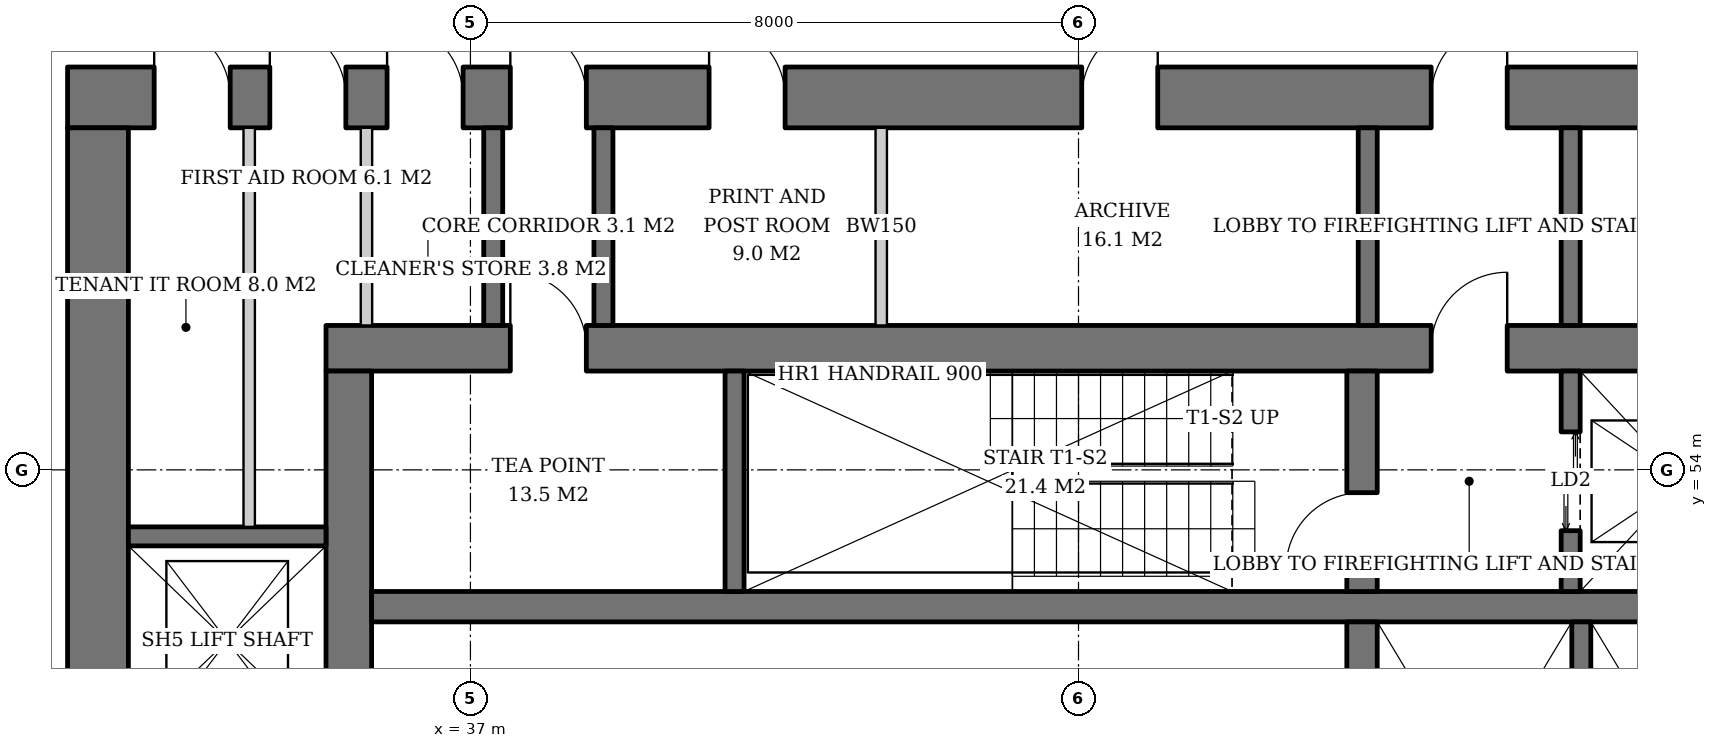
"""IFC4 building model, lengths in metres.
Left out: names, types, materials, properties, quantities, classifications, styles, units other than length and angle.
Written with IfcOpenShell. Run it as: python <this file> out.ifc"""

import sys

from ifc_helpers import new_model, si_unit, direction, frame, frame_2d, origin, place, context, subcontext, project, spatial, rectangle, extrude, element, fill, save


model = new_model("IFC4")
c1 = context("Model", 3, precision=1e-05, world=origin(), true_north=direction((0.0, 1.0)))
c2 = subcontext(c1, "Body", "Model", "MODEL_VIEW")
j1 = project(units=[si_unit("LENGTHUNIT", "METRE"), si_unit("PLANEANGLEUNIT", "RADIAN")], contexts=[c1])
p1 = place(None, origin())
s1 = spatial("IfcSite", under=j1, at=p1, CompositionType="ELEMENT")
p2 = place(p1, origin())
s2 = spatial("IfcBuilding", under=s1, at=p2, CompositionType="ELEMENT")
p3 = place(p2, frame((0.0, 0.0, 70.4)))
s3 = spatial("IfcBuildingStorey", under=s2, at=p3, CompositionType="ELEMENT", Elevation=70.4)
p4 = place(p3, frame((35.1, 55.6, 0.0), z_axis=(0.0, 0.0, 1.0), x_axis=(1.0, 0.0, 0.0)))
e1 = element("IfcWall", 1, at=p4, inside=s3, PredefinedType="SHEAR", context=c2, shape_type="SweptSolid", body=[
    extrude(rectangle(XDim=19.8, YDim=0.6, at=frame_2d((9.9, 0.0))), origin(), (0.0, 0.0, 1.0), 3.8),
])
p5 = place(p4, frame((14.54, 0.0, 0.0)))
e2 = element("IfcOpeningElement", 2, at=p5, cuts=e1, PredefinedType="OPENING", context=c2, shape_type="SweptSolid", body=[
    extrude(rectangle(XDim=1.0, YDim=2.1, at=frame_2d((0.5, 1.05))), frame((0.0, 0.31, 0.0), z_axis=(0.0, -1.0, 0.0), x_axis=(1.0, 0.0, 0.0)), (0.0, 0.0, 1.0), 0.62),
])
p6 = place(p4, frame((2.425, 0.0, 0.0)))
e3 = element("IfcOpeningElement", 3, at=p6, cuts=e1, PredefinedType="OPENING", context=c2, shape_type="SweptSolid", body=[
    extrude(rectangle(XDim=1.0, YDim=2.1, at=frame_2d((0.5, 1.05))), frame((0.0, 0.31, 0.0), z_axis=(0.0, -1.0, 0.0), x_axis=(1.0, 0.0, 0.0)), (0.0, 0.0, 1.0), 0.62),
])
p7 = place(p3, frame((35.4, 36.7, 0.0), z_axis=(0.0, 0.0, 1.0), x_axis=(0.0, 1.0, 0.0)))
e4 = element("IfcWall", 4, at=p7, inside=s3, PredefinedType="SHEAR", context=c2, shape_type="SweptSolid", body=[
    extrude(rectangle(XDim=18.6, YDim=0.6, at=frame_2d((9.3, 0.0))), origin(), (0.0, 0.0, 1.0), 3.8),
])
p8 = place(p7, frame((8.4, 0.0, 0.0)))
e5 = element("IfcOpeningElement", 5, at=p8, cuts=e4, PredefinedType="OPENING", context=c2, shape_type="SweptSolid", body=[
    extrude(rectangle(XDim=1.8, YDim=2.4, at=frame_2d((0.9, 1.2))), frame((0.0, 0.31, 0.0), z_axis=(0.0, -1.0, 0.0), x_axis=(1.0, 0.0, 0.0)), (0.0, 0.0, 1.0), 0.62),
])
p9 = place(p3, frame((31.7, 58.9, 0.0), z_axis=(0.0, 0.0, 1.0), x_axis=(1.0, 0.0, 0.0)))
e6 = element("IfcWall", 6, at=p9, inside=s3, PredefinedType="SHEAR", context=c2, shape_type="SweptSolid", body=[
    extrude(rectangle(XDim=26.6, YDim=0.8, at=frame_2d((13.3, 0.0))), origin(), (0.0, 0.0, 1.0), 3.8),
])
p10 = place(p9, frame((17.94, 0.0, 0.0)))
e7 = element("IfcOpeningElement", 7, at=p10, cuts=e6, PredefinedType="OPENING", context=c2, shape_type="SweptSolid", body=[
    extrude(rectangle(XDim=1.0, YDim=2.1, at=frame_2d((0.5, 1.05))), frame((0.0, 0.41, 0.0), z_axis=(0.0, -1.0, 0.0), x_axis=(1.0, 0.0, 0.0)), (0.0, 0.0, 1.0), 0.82),
])
p11 = place(p9, frame((5.825, 0.0, 0.0)))
e8 = element("IfcOpeningElement", 8, at=p11, cuts=e6, PredefinedType="OPENING", context=c2, shape_type="SweptSolid", body=[
    extrude(rectangle(XDim=1.0, YDim=2.1, at=frame_2d((0.5, 1.05))), frame((0.0, 0.41, 0.0), z_axis=(0.0, -1.0, 0.0), x_axis=(1.0, 0.0, 0.0)), (0.0, 0.0, 1.0), 0.82),
])
p12 = place(p9, frame((1.139, 0.0, 0.0)))
e9 = element("IfcOpeningElement", 9, at=p12, cuts=e6, PredefinedType="OPENING", context=c2, shape_type="SweptSolid", body=[
    extrude(rectangle(XDim=1.0, YDim=2.1, at=frame_2d((0.5, 1.05))), frame((0.0, 0.41, 0.0), z_axis=(0.0, -1.0, 0.0), x_axis=(1.0, 0.0, 0.0)), (0.0, 0.0, 1.0), 0.82),
])
p13 = place(p9, frame((2.661, 0.0, 0.0)))
e10 = element("IfcOpeningElement", 10, at=p13, cuts=e6, PredefinedType="OPENING", context=c2, shape_type="SweptSolid", body=[
    extrude(rectangle(XDim=1.0, YDim=2.1, at=frame_2d((0.5, 1.05))), frame((0.0, 0.41, 0.0), z_axis=(0.0, -1.0, 0.0), x_axis=(1.0, 0.0, 0.0)), (0.0, 0.0, 1.0), 0.82),
])
p14 = place(p9, frame((4.204, 0.0, 0.0)))
e11 = element("IfcOpeningElement", 11, at=p14, cuts=e6, PredefinedType="OPENING", context=c2, shape_type="SweptSolid", body=[
    extrude(rectangle(XDim=1.0, YDim=2.1, at=frame_2d((0.5, 1.05))), frame((0.0, 0.41, 0.0), z_axis=(0.0, -1.0, 0.0), x_axis=(1.0, 0.0, 0.0)), (0.0, 0.0, 1.0), 0.82),
])
p15 = place(p9, frame((8.44, 0.0, 0.0)))
e12 = element("IfcOpeningElement", 12, at=p15, cuts=e6, PredefinedType="OPENING", context=c2, shape_type="SweptSolid", body=[
    extrude(rectangle(XDim=1.0, YDim=2.1, at=frame_2d((0.5, 1.05))), frame((0.0, 0.41, 0.0), z_axis=(0.0, -1.0, 0.0), x_axis=(1.0, 0.0, 0.0)), (0.0, 0.0, 1.0), 0.82),
])
p16 = place(p9, frame((13.342, 0.0, 0.0)))
e13 = element("IfcOpeningElement", 13, at=p16, cuts=e6, PredefinedType="OPENING", context=c2, shape_type="SweptSolid", body=[
    extrude(rectangle(XDim=1.0, YDim=2.1, at=frame_2d((0.5, 1.05))), frame((0.0, 0.41, 0.0), z_axis=(0.0, -1.0, 0.0), x_axis=(1.0, 0.0, 0.0)), (0.0, 0.0, 1.0), 0.82),
])
p17 = place(p9, frame((22.35, 0.0, 0.0)))
e14 = element("IfcOpeningElement", 14, at=p17, cuts=e6, PredefinedType="OPENING", context=c2, shape_type="SweptSolid", body=[
    extrude(rectangle(XDim=1.0, YDim=2.1, at=frame_2d((0.5, 1.05))), frame((0.0, 0.41, 0.0), z_axis=(0.0, -1.0, 0.0), x_axis=(1.0, 0.0, 0.0)), (0.0, 0.0, 1.0), 0.82),
])
p18 = place(p3, frame((32.1, 33.5, 0.0), z_axis=(0.0, 0.0, 1.0), x_axis=(0.0, 1.0, 0.0)))
e15 = element("IfcWall", 15, at=p18, inside=s3, PredefinedType="SHEAR", context=c2, shape_type="SweptSolid", body=[
    extrude(rectangle(XDim=25.0, YDim=0.8, at=frame_2d((12.5, 0.0))), origin(), (0.0, 0.0, 1.0), 3.8),
])
p19 = place(p18, frame((11.6, 0.0, 0.0)))
e16 = element("IfcOpeningElement", 16, at=p19, cuts=e15, PredefinedType="OPENING", context=c2, shape_type="SweptSolid", body=[
    extrude(rectangle(XDim=1.8, YDim=2.4, at=frame_2d((0.9, 1.2))), frame((0.0, 0.41, 0.0), z_axis=(0.0, -1.0, 0.0), x_axis=(1.0, 0.0, 0.0)), (0.0, 0.0, 1.0), 0.82),
])
p20 = place(p3, frame((35.7, 52.2, 0.0), z_axis=(0.0, 0.0, 1.0), x_axis=(1.0, 0.0, 0.0)))
e17 = element("IfcWall", 17, at=p20, inside=s3, PredefinedType="SHEAR", context=c2, shape_type="SweptSolid", body=[
    extrude(rectangle(XDim=18.6, YDim=0.4, at=frame_2d((9.3, 0.0))), origin(), (0.0, 0.0, 1.0), 3.8),
])
p21 = place(p3, frame((48.73, 40.0, 0.0), z_axis=(0.0, 0.0, 1.0), x_axis=(0.0, 1.0, 0.0)))
e18 = element("IfcWall", 18, at=p21, inside=s3, PredefinedType="SHEAR", context=c2, shape_type="SweptSolid", body=[
    extrude(rectangle(XDim=12.0, YDim=0.4, at=frame_2d((6.0, 0.0))), origin(), (0.0, 0.0, 1.0), 3.8),
])
p22 = place(p3, frame((48.73, 52.4, 0.0), z_axis=(0.0, 0.0, 1.0), x_axis=(0.0, 1.0, 0.0)))
e19 = element("IfcWall", 19, at=p22, inside=s3, PredefinedType="SHEAR", context=c2, shape_type="SweptSolid", body=[
    extrude(rectangle(XDim=2.9, YDim=0.4, at=frame_2d((1.45, 0.0))), origin(), (0.0, 0.0, 1.0), 3.8),
])
p23 = place(p22, frame((0.3, 0.0, 0.0)))
e20 = element("IfcOpeningElement", 20, at=p23, cuts=e19, PredefinedType="OPENING", context=c2, shape_type="SweptSolid", body=[
    extrude(rectangle(XDim=1.0, YDim=2.1, at=frame_2d((0.5, 1.05))), frame((0.0, 0.21, 0.0), z_axis=(0.0, -1.0, 0.0), x_axis=(1.0, 0.0, 0.0)), (0.0, 0.0, 1.0), 0.42),
])
p24 = place(p3, frame((40.475, 52.4, 0.0), z_axis=(0.0, 0.0, 1.0), x_axis=(0.0, 1.0, 0.0)))
e21 = element("IfcWall", 21, at=p24, inside=s3, PredefinedType="SHEAR", context=c2, shape_type="SweptSolid", body=[
    extrude(rectangle(XDim=2.9, YDim=0.25, at=frame_2d((1.45, 0.0))), origin(), (0.0, 0.0, 1.0), 3.8),
])
p25 = place(p3, frame((51.475, 52.4, 0.0), z_axis=(0.0, 0.0, 1.0), x_axis=(0.0, 1.0, 0.0)))
e22 = element("IfcWall", 22, at=p25, inside=s3, PredefinedType="SHEAR", context=c2, shape_type="SweptSolid", body=[
    extrude(rectangle(XDim=2.9, YDim=0.25, at=frame_2d((1.45, 0.0))), origin(), (0.0, 0.0, 1.0), 3.8),
])
p26 = place(p25, frame((0.8, 0.0, 0.0)))
e23 = element("IfcOpeningElement", 23, at=p26, cuts=e22, PredefinedType="OPENING", context=c2, shape_type="SweptSolid", body=[
    extrude(rectangle(XDim=1.3, YDim=2.2, at=frame_2d((0.65, 1.1))), frame((0.0, 0.135, 0.0), z_axis=(0.0, -1.0, 0.0), x_axis=(1.0, 0.0, 0.0)), (0.0, 0.0, 1.0), 0.27),
])
p27 = place(p3, frame((51.615, 47.75, 0.0), z_axis=(0.0, 0.0, 1.0), x_axis=(0.0, 1.0, 0.0)))
e24 = element("IfcWall", 24, at=p27, inside=s3, PredefinedType="SHEAR", context=c2, shape_type="SweptSolid", body=[
    extrude(rectangle(XDim=4.25, YDim=0.25, at=frame_2d((2.125, 0.0))), origin(), (0.0, 0.0, 1.0), 3.8),
])
p28 = place(p3, frame((32.5, 53.125, 0.0), z_axis=(0.0, 0.0, 1.0), x_axis=(1.0, 0.0, 0.0)))
e25 = element("IfcWall", 25, at=p28, inside=s3, PredefinedType="SHEAR", context=c2, shape_type="SweptSolid", body=[
    extrude(rectangle(XDim=2.6, YDim=0.25, at=frame_2d((1.3, 0.0))), origin(), (0.0, 0.0, 1.0), 3.8),
])
for number, where, z_axis, x_axis in (
    (26, (48.805, 55.9, 0.0), (0.0, 0.0, 1.0), (0.0, 1.0, 0.0)),
    (27, (51.475, 55.9, 0.0), (0.0, 0.0, 1.0), (0.0, 1.0, 0.0)),
    (28, (37.3, 55.9, 0.0), (0.0, 0.0, 1.0), (0.0, 1.0, 0.0)),
    (29, (38.75, 55.9, 0.0), (0.0, 0.0, 1.0), (0.0, 1.0, 0.0)),
):
    element("IfcWall", number, at=place(p3, frame(where, z_axis=z_axis, x_axis=x_axis)), inside=s3, PredefinedType="SOLIDWALL", context=c2, shape_type="SweptSolid", body=[
        extrude(rectangle(XDim=2.6, YDim=0.25, at=frame_2d((1.3, 0.0))), origin(), (0.0, 0.0, 1.0), 3.62),
    ])
p29 = place(p3, frame((34.09, 53.25, 0.0), z_axis=(0.0, 0.0, 1.0), x_axis=(0.0, 1.0, 0.0)))
e30 = element("IfcWall", 30, at=p29, inside=s3, PredefinedType="SOLIDWALL", context=c2, shape_type="SweptSolid", body=[
    extrude(rectangle(XDim=5.25, YDim=0.15, at=frame_2d((2.625, 0.0))), origin(), (0.0, 0.0, 1.0), 3.62),
])
for number, where, z_axis, x_axis in (
    (31, (35.632, 55.9, 0.0), (0.0, 0.0, 1.0), (0.0, 1.0, 0.0)),
    (32, (42.405, 55.9, 0.0), (0.0, 0.0, 1.0), (0.0, 1.0, 0.0)),
):
    element("IfcWall", number, at=place(p3, frame(where, z_axis=z_axis, x_axis=x_axis)), inside=s3, PredefinedType="SOLIDWALL", context=c2, shape_type="SweptSolid", body=[
        extrude(rectangle(XDim=2.6, YDim=0.15, at=frame_2d((1.3, 0.0))), origin(), (0.0, 0.0, 1.0), 3.62),
    ])
p30 = place(p26, origin())
e33 = element("IfcDoor", 33, at=p30, inside=s3, OperationType="DOUBLE_DOOR_SLIDING", PredefinedType="DOOR", context=c2, shape_type="SweptSolid", body=[
    extrude(rectangle(XDim=1.3, YDim=2.2, at=frame_2d((0.65, 1.1))), frame((0.0, 0.025, 0.0), z_axis=(0.0, -1.0, 0.0), x_axis=(1.0, 0.0, 0.0)), (0.0, 0.0, 1.0), 0.05),
])
fill(e23, e33)
p31 = place(p23, origin())
e34 = element("IfcDoor", 34, at=p31, inside=s3, OperationType="SINGLE_SWING_LEFT", PredefinedType="DOOR", context=c2, shape_type="SweptSolid", body=[
    extrude(rectangle(XDim=1.0, YDim=2.1, at=frame_2d((0.5, 1.05))), frame((0.0, 0.025, 0.0), z_axis=(0.0, -1.0, 0.0), x_axis=(1.0, 0.0, 0.0)), (0.0, 0.0, 1.0), 0.05),
])
fill(e20, e34)
p32 = place(p5, origin())
e35 = element("IfcDoor", 35, at=p32, inside=s3, OperationType="SINGLE_SWING_RIGHT", PredefinedType="DOOR", context=c2, shape_type="SweptSolid", body=[
    extrude(rectangle(XDim=1.0, YDim=2.1, at=frame_2d((0.5, 1.05))), frame((0.0, 0.025, 0.0), z_axis=(0.0, -1.0, 0.0), x_axis=(1.0, 0.0, 0.0)), (0.0, 0.0, 1.0), 0.05),
])
fill(e2, e35)
p33 = place(p10, origin())
e36 = element("IfcDoor", 36, at=p33, inside=s3, OperationType="SINGLE_SWING_RIGHT", PredefinedType="DOOR", context=c2, shape_type="SweptSolid", body=[
    extrude(rectangle(XDim=1.0, YDim=2.1, at=frame_2d((0.5, 1.05))), frame((0.0, 0.025, 0.0), z_axis=(0.0, -1.0, 0.0), x_axis=(1.0, 0.0, 0.0)), (0.0, 0.0, 1.0), 0.05),
])
fill(e7, e36)
p34 = place(p11, origin())
e37 = element("IfcDoor", 37, at=p34, inside=s3, OperationType="SINGLE_SWING_LEFT", PredefinedType="DOOR", context=c2, shape_type="SweptSolid", body=[
    extrude(rectangle(XDim=1.0, YDim=2.1, at=frame_2d((0.5, 1.05))), frame((0.0, 0.025, 0.0), z_axis=(0.0, -1.0, 0.0), x_axis=(1.0, 0.0, 0.0)), (0.0, 0.0, 1.0), 0.05),
])
fill(e8, e37)
p35 = place(p6, origin())
e38 = element("IfcDoor", 38, at=p35, inside=s3, OperationType="SINGLE_SWING_LEFT", PredefinedType="DOOR", context=c2, shape_type="SweptSolid", body=[
    extrude(rectangle(XDim=1.0, YDim=2.1, at=frame_2d((0.5, 1.05))), frame((0.0, -0.24, 0.0), z_axis=(0.0, -1.0, 0.0), x_axis=(1.0, 0.0, 0.0)), (0.0, 0.0, 1.0), 0.05),
])
fill(e3, e38)
p36 = place(p12, origin())
e39 = element("IfcDoor", 39, at=p36, inside=s3, OperationType="SINGLE_SWING_LEFT", PredefinedType="DOOR", context=c2, shape_type="SweptSolid", body=[
    extrude(rectangle(XDim=1.0, YDim=2.1, at=frame_2d((0.5, 1.05))), frame((0.0, -0.34, 0.0), z_axis=(0.0, -1.0, 0.0), x_axis=(1.0, 0.0, 0.0)), (0.0, 0.0, 1.0), 0.05),
])
fill(e9, e39)
p37 = place(p13, origin())
e40 = element("IfcDoor", 40, at=p37, inside=s3, OperationType="SINGLE_SWING_LEFT", PredefinedType="DOOR", context=c2, shape_type="SweptSolid", body=[
    extrude(rectangle(XDim=1.0, YDim=2.1, at=frame_2d((0.5, 1.05))), frame((0.0, -0.34, 0.0), z_axis=(0.0, -1.0, 0.0), x_axis=(1.0, 0.0, 0.0)), (0.0, 0.0, 1.0), 0.05),
])
fill(e10, e40)
p38 = place(p14, origin())
e41 = element("IfcDoor", 41, at=p38, inside=s3, OperationType="SINGLE_SWING_LEFT", PredefinedType="DOOR", context=c2, shape_type="SweptSolid", body=[
    extrude(rectangle(XDim=1.0, YDim=2.1, at=frame_2d((0.5, 1.05))), frame((0.0, -0.34, 0.0), z_axis=(0.0, -1.0, 0.0), x_axis=(1.0, 0.0, 0.0)), (0.0, 0.0, 1.0), 0.05),
])
fill(e11, e41)
p39 = place(p15, origin())
e42 = element("IfcDoor", 42, at=p39, inside=s3, OperationType="SINGLE_SWING_LEFT", PredefinedType="DOOR", context=c2, shape_type="SweptSolid", body=[
    extrude(rectangle(XDim=1.0, YDim=2.1, at=frame_2d((0.5, 1.05))), frame((0.0, -0.34, 0.0), z_axis=(0.0, -1.0, 0.0), x_axis=(1.0, 0.0, 0.0)), (0.0, 0.0, 1.0), 0.05),
])
fill(e12, e42)
p40 = place(p16, origin())
e43 = element("IfcDoor", 43, at=p40, inside=s3, OperationType="SINGLE_SWING_RIGHT", PredefinedType="DOOR", context=c2, shape_type="SweptSolid", body=[
    extrude(rectangle(XDim=1.0, YDim=2.1, at=frame_2d((0.5, 1.05))), frame((0.0, -0.34, 0.0), z_axis=(0.0, -1.0, 0.0), x_axis=(1.0, 0.0, 0.0)), (0.0, 0.0, 1.0), 0.05),
])
fill(e13, e43)
save(model, sys.argv[1])
